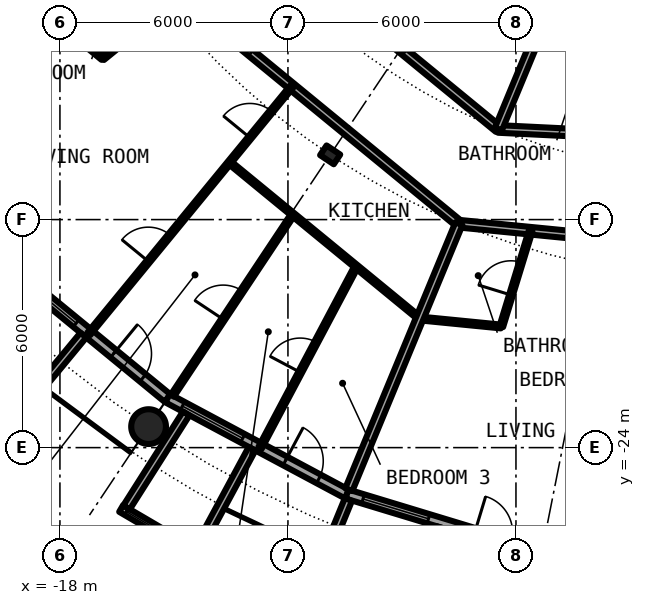
"""IFC4 building model, lengths in metres.
Left out: names, types, materials, properties, quantities, classifications, styles, units other than length and angle.
Written with IfcOpenShell. Run it as: python <this file> out.ifc"""

import sys

from ifc_helpers import new_model, si_unit, direction, frame, frame_2d, origin, origin_2d, place, context, subcontext, project, spatial, rectangle, circle, hollow_circle, i_section, extrude, element, fill, save


model = new_model("IFC4")
c1 = context("Model", 3, precision=1e-05, world=origin(), true_north=direction((0.0, 1.0)))
c2 = subcontext(c1, "Body", "Model", "MODEL_VIEW")
j1 = project(units=[si_unit("LENGTHUNIT", "METRE"), si_unit("PLANEANGLEUNIT", "RADIAN")], contexts=[c1])
p1 = place(None, origin())
s1 = spatial("IfcSite", under=j1, at=p1, CompositionType="ELEMENT")
p2 = place(p1, origin())
s2 = spatial("IfcBuilding", under=s1, at=p2, CompositionType="ELEMENT")
p3 = place(p2, frame((0.0, 0.0, 111.65)))
s3 = spatial("IfcBuildingStorey", under=s2, at=p3, CompositionType="ELEMENT", Elevation=111.65)
p4 = place(p3, frame((-15.667, -23.448, 0.0), z_axis=(0.0, 0.0, 1.0), x_axis=(1.0, 0.0, 0.0)))
e1 = element("IfcColumn", 1, at=p4, inside=s3, PredefinedType="COLUMN", context=c2, shape_type="SweptSolid", body=[
    extrude(hollow_circle(Radius=0.457, WallThickness=0.04, at=origin_2d()), origin(), (0.0, 0.0, 1.0), 3.05),
])
p5 = place(p3, frame((-10.889, -16.297, 0.0), z_axis=(0.0, 0.0, 1.0), x_axis=(-0.55557023302, -0.831469612303, 0.0)))
e2 = element("IfcColumn", 2, at=p5, inside=s3, PredefinedType="COLUMN", context=c2, shape_type="SweptSolid", body=[
    extrude(i_section(OverallWidth=0.307, OverallDepth=0.432, WebThickness=0.021, FlangeThickness=0.04, FilletRadius=0.027, at=origin_2d()), origin(), (0.0, 0.0, 1.0), 3.05),
])
p6 = place(p3, frame((-19.304, -19.304, 0.0), z_axis=(0.0, 0.0, 1.0), x_axis=(0.773019449054, -0.634382322723, 0.0)))
e3 = element("IfcWall", 3, at=p6, inside=s3, PredefinedType="SOLIDWALL", context=c2, shape_type="SweptSolid", body=[
    extrude(rectangle(XDim=5.352, YDim=0.25, at=frame_2d((2.676, 0.0))), origin(), (0.0, 0.0, 1.0), 2.7),
])
p7 = place(p6, frame((0.441, 0.0, 0.3)))
e4 = element("IfcOpeningElement", 4, at=p7, cuts=e3, PredefinedType="OPENING", context=c2, shape_type="SweptSolid", body=[
    extrude(rectangle(XDim=1.8, YDim=2.1, at=frame_2d((0.9, 1.05))), frame((0.0, 0.135, 0.0), z_axis=(0.0, -1.0, 0.0), x_axis=(1.0, 0.0, 0.0)), (0.0, 0.0, 1.0), 0.27),
])
p8 = place(p6, frame((3.51, 0.0, 0.0)))
e5 = element("IfcOpeningElement", 5, at=p8, cuts=e3, PredefinedType="OPENING", context=c2, shape_type="SweptSolid", body=[
    extrude(rectangle(XDim=1.0, YDim=2.2, at=frame_2d((0.5, 1.1))), frame((0.0, 0.135, 0.0), z_axis=(0.0, -1.0, 0.0), x_axis=(1.0, 0.0, 0.0)), (0.0, 0.0, 1.0), 0.27),
])
p9 = place(p3, frame((-17.384, -21.041, -0.03), z_axis=(0.0, 0.0, 1.0), x_axis=(-0.63709551667, -0.770784861449, 0.0)))
e6 = element("IfcWall", 6, at=p9, inside=s3, PredefinedType="SOLIDWALL", context=c2, shape_type="SweptSolid", body=[
    extrude(rectangle(XDim=3.006, YDim=0.2, at=frame_2d((1.503, 0.0))), origin(), (0.0, 0.0, 1.0), 2.73),
])
p10 = place(p3, frame((-15.167, -22.699, 0.0), z_axis=(0.0, 0.0, 1.0), x_axis=(0.881915646801, -0.471407246368, 0.0)))
e7 = element("IfcWall", 7, at=p10, inside=s3, PredefinedType="SOLIDWALL", context=c2, shape_type="SweptSolid", body=[
    extrude(rectangle(XDim=5.352, YDim=0.25, at=frame_2d((2.676, 0.0))), origin(), (0.0, 0.0, 1.0), 2.7),
])
p11 = place(p10, frame((0.441, 0.0, 0.3)))
e8 = element("IfcOpeningElement", 8, at=p11, cuts=e7, PredefinedType="OPENING", context=c2, shape_type="SweptSolid", body=[
    extrude(rectangle(XDim=1.8, YDim=2.1, at=frame_2d((0.9, 1.05))), frame((0.0, 0.135, 0.0), z_axis=(0.0, -1.0, 0.0), x_axis=(1.0, 0.0, 0.0)), (0.0, 0.0, 1.0), 0.27),
])
p12 = place(p10, frame((3.51, 0.0, 0.0)))
e9 = element("IfcOpeningElement", 9, at=p12, cuts=e7, PredefinedType="OPENING", context=c2, shape_type="SweptSolid", body=[
    extrude(rectangle(XDim=1.0, YDim=2.2, at=frame_2d((0.5, 1.1))), frame((0.0, 0.135, 0.0), z_axis=(0.0, -1.0, 0.0), x_axis=(1.0, 0.0, 0.0)), (0.0, 0.0, 1.0), 0.27),
])
p13 = place(p3, frame((-16.39, -25.603, -0.03), z_axis=(0.0, 0.0, 1.0), x_axis=(0.862762477128, -0.505609442218, 0.0)))
e10 = element("IfcWall", 10, at=p13, inside=s3, PredefinedType="SOLIDWALL", context=c2, shape_type="SweptSolid", body=[
    extrude(rectangle(XDim=2.391, YDim=0.2, at=frame_2d((1.196, 0.0))), origin(), (0.0, 0.0, 1.0), 2.73),
])
p14 = place(p13, frame((0.156, 0.0, 0.33)))
e11 = element("IfcOpeningElement", 11, at=p14, cuts=e10, PredefinedType="OPENING", context=c2, shape_type="SweptSolid", body=[
    extrude(circle(Radius=1.04, at=frame_2d((1.04, 1.04))), frame((0.0, 0.11, 0.0), z_axis=(0.0, -1.0, 0.0), x_axis=(1.0, 0.0, 0.0)), (0.0, 0.0, 1.0), 0.22),
])
p15 = place(p3, frame((-14.678, -23.102, -0.03), z_axis=(0.0, 0.0, 1.0), x_axis=(-0.536001536573, -0.844217005746, 0.0)))
e12 = element("IfcWall", 12, at=p15, inside=s3, PredefinedType="SOLIDWALL", context=c2, shape_type="SweptSolid", body=[
    extrude(rectangle(XDim=2.929, YDim=0.2, at=frame_2d((1.465, 0.0))), origin(), (0.0, 0.0, 1.0), 2.73),
])
p16 = place(p3, frame((-12.945, -24.029, -0.03), z_axis=(0.0, 0.0, 1.0), x_axis=(-0.474424310775, -0.88029629861, 0.0)))
e13 = element("IfcWall", 13, at=p16, inside=s3, PredefinedType="SOLIDWALL", context=c2, shape_type="SweptSolid", body=[
    extrude(rectangle(XDim=3.006, YDim=0.2, at=frame_2d((1.503, 0.0))), origin(), (0.0, 0.0, 1.0), 2.73),
])
p17 = place(p3, frame((-10.447, -25.222, 0.0), z_axis=(0.0, 0.0, 1.0), x_axis=(0.956965678721, -0.290201119486, 0.0)))
e14 = element("IfcWall", 14, at=p17, inside=s3, PredefinedType="SOLIDWALL", context=c2, shape_type="SweptSolid", body=[
    extrude(rectangle(XDim=5.351, YDim=0.25, at=frame_2d((2.676, 0.0))), origin(), (0.0, 0.0, 1.0), 2.7),
])
p18 = place(p17, frame((0.441, 0.0, 0.3)))
e15 = element("IfcOpeningElement", 15, at=p18, cuts=e14, PredefinedType="OPENING", context=c2, shape_type="SweptSolid", body=[
    extrude(rectangle(XDim=1.8, YDim=2.1, at=frame_2d((0.9, 1.05))), frame((0.0, 0.135, 0.0), z_axis=(0.0, -1.0, 0.0), x_axis=(1.0, 0.0, 0.0)), (0.0, 0.0, 1.0), 0.27),
])
p19 = place(p17, frame((3.51, 0.0, 0.0)))
e16 = element("IfcOpeningElement", 16, at=p19, cuts=e14, PredefinedType="OPENING", context=c2, shape_type="SweptSolid", body=[
    extrude(rectangle(XDim=1.0, YDim=2.2, at=frame_2d((0.5, 1.1))), frame((0.0, 0.135, 0.0), z_axis=(0.0, -1.0, 0.0), x_axis=(1.0, 0.0, 0.0)), (0.0, 0.0, 1.0), 0.27),
])
p20 = place(p3, frame((-10.409, -25.364, -0.03), z_axis=(0.0, 0.0, 1.0), x_axis=(-0.379509886562, -0.925187681501, 0.0)))
e17 = element("IfcWall", 17, at=p20, inside=s3, PredefinedType="SOLIDWALL", context=c2, shape_type="SweptSolid", body=[
    extrude(rectangle(XDim=2.883, YDim=0.2, at=frame_2d((1.441, 0.0))), origin(), (0.0, 0.0, 1.0), 2.73),
])
p21 = place(p3, frame((-8.009, -26.092, -0.03), z_axis=(0.0, 0.0, 1.0), x_axis=(-0.293406695073, -0.955987715029, 0.0)))
e18 = element("IfcWall", 18, at=p21, inside=s3, PredefinedType="SOLIDWALL", context=c2, shape_type="SweptSolid", body=[
    extrude(rectangle(XDim=3.006, YDim=0.2, at=frame_2d((1.503, 0.0))), origin(), (0.0, 0.0, 1.0), 2.73),
])
p22 = place(p3, frame((-18.542, -12.389, 0.0), z_axis=(0.0, 0.0, 1.0), x_axis=(0.772948171844, -0.634469166818, 0.0)))
e19 = element("IfcWall", 19, at=p22, inside=s3, PredefinedType="PARTITIONING", context=c2, shape_type="SweptSolid", body=[
    extrude(rectangle(XDim=2.158, YDim=0.1, at=frame_2d((1.079, 0.0))), origin(), (0.0, 0.0, 1.0), 2.7),
])
p23 = place(p3, frame((-13.538, -16.496, 0.0), z_axis=(0.0, 0.0, 1.0), x_axis=(0.773000340237, -0.634405606843, 0.0)))
e20 = element("IfcWall", 20, at=p23, inside=s3, PredefinedType="PARTITIONING", context=c2, shape_type="SweptSolid", body=[
    extrude(rectangle(XDim=6.474, YDim=0.1, at=frame_2d((3.237, 0.0))), origin(), (0.0, 0.0, 1.0), 2.7),
])
p24 = place(p3, frame((-8.541, -20.601, 0.0), z_axis=(0.0, 0.0, 1.0), x_axis=(0.995168464509, -0.098182112661, 0.0)))
e21 = element("IfcWall", 21, at=p24, inside=s3, PredefinedType="PARTITIONING", context=c2, shape_type="SweptSolid", body=[
    extrude(rectangle(XDim=2.158, YDim=0.1, at=frame_2d((1.079, 0.0))), origin(), (0.0, 0.0, 1.0), 2.7),
])
p25 = place(p3, frame((-16.173, -10.991, 0.0), z_axis=(0.0, 0.0, 1.0), x_axis=(0.773013989296, -0.634388975591, 0.0)))
e22 = element("IfcWall", 22, at=p25, inside=s3, PredefinedType="PARTITIONING", context=c2, shape_type="SweptSolid", body=[
    extrude(rectangle(XDim=11.219, YDim=0.2, at=frame_2d((5.609, 0.0))), origin(), (0.0, 0.0, 1.0), 2.39),
])
p26 = place(p25, frame((3.135, 0.0, 0.0)))
e23 = element("IfcOpeningElement", 23, at=p26, cuts=e22, PredefinedType="OPENING", context=c2, shape_type="SweptSolid", body=[
    extrude(rectangle(XDim=1.0, YDim=2.3, at=frame_2d((0.5, 1.15))), frame((0.0, 0.11, 0.0), z_axis=(0.0, -1.0, 0.0), x_axis=(1.0, 0.0, 0.0)), (0.0, 0.0, 1.0), 0.22),
])
p27 = place(p3, frame((-7.501, -18.108, 0.0), z_axis=(0.0, 0.0, 1.0), x_axis=(0.995189414306, -0.097969534313, 0.0)))
e24 = element("IfcWall", 24, at=p27, inside=s3, PredefinedType="PARTITIONING", context=c2, shape_type="SweptSolid", body=[
    extrude(rectangle(XDim=11.219, YDim=0.2, at=frame_2d((5.609, 0.0))), origin(), (0.0, 0.0, 1.0), 2.39),
])
p28 = place(p27, frame((3.847, 0.0, 0.0)))
e25 = element("IfcOpeningElement", 25, at=p28, cuts=e24, PredefinedType="OPENING", context=c2, shape_type="SweptSolid", body=[
    extrude(rectangle(XDim=1.0, YDim=2.3, at=frame_2d((0.5, 1.15))), frame((0.0, 0.11, 0.0), z_axis=(0.0, -1.0, 0.0), x_axis=(1.0, 0.0, 0.0)), (0.0, 0.0, 1.0), 0.22),
])
p29 = place(p3, frame((-14.05, -9.392, 0.0), z_axis=(0.0, 0.0, 1.0), x_axis=(0.773074935257, -0.634314704605, 0.0)))
e26 = element("IfcWall", 26, at=p29, inside=s3, PredefinedType="PARTITIONING", context=c2, shape_type="SweptSolid", body=[
    extrude(rectangle(XDim=9.809, YDim=0.2, at=frame_2d((4.904, 0.0))), origin(), (0.0, 0.0, 1.0), 2.7),
])
p30 = place(p29, frame((4.402, 0.0, 0.0)))
e27 = element("IfcOpeningElement", 27, at=p30, cuts=e26, PredefinedType="OPENING", context=c2, shape_type="SweptSolid", body=[
    extrude(rectangle(XDim=1.0, YDim=2.3, at=frame_2d((0.5, 1.15))), frame((0.0, 0.11, 0.0), z_axis=(0.0, -1.0, 0.0), x_axis=(1.0, 0.0, 0.0)), (0.0, 0.0, 1.0), 0.22),
])
p31 = place(p3, frame((-6.467, -15.615, 0.0), z_axis=(0.0, 0.0, 1.0), x_axis=(0.998803328932, -0.048907158111, 0.0)))
e28 = element("IfcWall", 28, at=p31, inside=s3, PredefinedType="PARTITIONING", context=c2, shape_type="SweptSolid", body=[
    extrude(rectangle(XDim=11.392, YDim=0.2, at=frame_2d((5.696, 0.0))), origin(), (0.0, 0.0, 1.0), 2.7),
])
p32 = place(p31, frame((4.381, 0.0, 0.0)))
e29 = element("IfcOpeningElement", 29, at=p32, cuts=e28, PredefinedType="OPENING", context=c2, shape_type="SweptSolid", body=[
    extrude(rectangle(XDim=1.0, YDim=2.3, at=frame_2d((0.5, 1.15))), frame((0.0, 0.11, 0.0), z_axis=(0.0, -1.0, 0.0), x_axis=(1.0, 0.0, 0.0)), (0.0, 0.0, 1.0), 0.22),
])
p33 = place(p3, frame((-22.595, -15.097, 0.0), z_axis=(0.0, 0.0, 1.0), x_axis=(0.831467903109, 0.555572791, 0.0)))
e30 = element("IfcWall", 30, at=p33, inside=s3, PredefinedType="PARTITIONING", context=c2, shape_type="SweptSolid", body=[
    extrude(rectangle(XDim=7.358, YDim=0.2, at=frame_2d((3.679, 0.0))), origin(), (0.0, 0.0, 1.0), 2.7),
])
p34 = place(p3, frame((-17.24, -21.007, 0.0), z_axis=(0.0, 0.0, 1.0), x_axis=(0.634396151441, 0.77300810024, 0.0)))
e31 = element("IfcWall", 31, at=p34, inside=s3, PredefinedType="PARTITIONING", context=c2, shape_type="SweptSolid", body=[
    extrude(rectangle(XDim=8.419, YDim=0.1, at=frame_2d((4.209, 0.0))), origin(), (0.0, 0.0, 1.0), 2.7),
])
p35 = place(p34, frame((6.679, 0.0, 0.0)))
e32 = element("IfcOpeningElement", 32, at=p35, cuts=e31, PredefinedType="OPENING", context=c2, shape_type="SweptSolid", body=[
    extrude(rectangle(XDim=0.9, YDim=2.3, at=frame_2d((0.45, 1.15))), frame((0.0, 0.06, 0.0), z_axis=(0.0, -1.0, 0.0), x_axis=(1.0, 0.0, 0.0)), (0.0, 0.0, 1.0), 0.12),
])
p36 = place(p34, frame((2.468, 0.0, 0.0)))
e33 = element("IfcOpeningElement", 33, at=p36, cuts=e31, PredefinedType="OPENING", context=c2, shape_type="SweptSolid", body=[
    extrude(rectangle(XDim=0.9, YDim=2.3, at=frame_2d((0.45, 1.15))), frame((0.0, 0.06, 0.0), z_axis=(0.0, -1.0, 0.0), x_axis=(1.0, 0.0, 0.0)), (0.0, 0.0, 1.0), 0.12),
])
p37 = place(p3, frame((-16.872, -13.761, 0.0), z_axis=(0.0, 0.0, 1.0), x_axis=(0.774979608522, 0.631986239072, 0.0)))
e34 = element("IfcWall", 34, at=p37, inside=s3, PredefinedType="PARTITIONING", context=c2, shape_type="SweptSolid", body=[
    extrude(rectangle(XDim=2.636, YDim=0.1, at=frame_2d((1.318, 0.0))), origin(), (0.0, 0.0, 1.0), 2.7),
])
p38 = place(p37, frame((0.868, 0.0, 0.0)))
e35 = element("IfcOpeningElement", 35, at=p38, cuts=e34, PredefinedType="OPENING", context=c2, shape_type="SweptSolid", body=[
    extrude(rectangle(XDim=0.9, YDim=2.3, at=frame_2d((0.45, 1.15))), frame((0.0, 0.06, 0.0), z_axis=(0.0, -1.0, 0.0), x_axis=(1.0, 0.0, 0.0)), (0.0, 0.0, 1.0), 0.12),
])
p39 = place(p3, frame((-15.041, -22.632, 0.0), z_axis=(0.0, 0.0, 1.0), x_axis=(0.553637025191, 0.83275809473, 0.0)))
e36 = element("IfcWall", 36, at=p39, inside=s3, PredefinedType="PARTITIONING", context=c2, shape_type="SweptSolid", body=[
    extrude(rectangle(XDim=5.726, YDim=0.1, at=frame_2d((2.863, 0.0))), origin(), (0.0, 0.0, 1.0), 2.7),
])
p40 = place(p39, frame((2.412, 0.0, 0.0)))
e37 = element("IfcOpeningElement", 37, at=p40, cuts=e36, PredefinedType="OPENING", context=c2, shape_type="SweptSolid", body=[
    extrude(rectangle(XDim=0.9, YDim=2.3, at=frame_2d((0.45, 1.15))), frame((0.0, 0.06, 0.0), z_axis=(0.0, -1.0, 0.0), x_axis=(1.0, 0.0, 0.0)), (0.0, 0.0, 1.0), 0.12),
])
p41 = place(p3, frame((-12.734, -24.007, 0.0), z_axis=(0.0, 0.0, 1.0), x_axis=(0.468610030042, 0.883405139075, 0.0)))
e38 = element("IfcWall", 38, at=p41, inside=s3, PredefinedType="PARTITIONING", context=c2, shape_type="SweptSolid", body=[
    extrude(rectangle(XDim=5.403, YDim=0.1, at=frame_2d((2.702, 0.0))), origin(), (0.0, 0.0, 1.0), 2.7),
])
p42 = place(p41, frame((2.252, 0.0, 0.0)))
e39 = element("IfcOpeningElement", 39, at=p42, cuts=e38, PredefinedType="OPENING", context=c2, shape_type="SweptSolid", body=[
    extrude(rectangle(XDim=0.9, YDim=2.3, at=frame_2d((0.45, 1.15))), frame((0.0, 0.06, 0.0), z_axis=(0.0, -1.0, 0.0), x_axis=(1.0, 0.0, 0.0)), (0.0, 0.0, 1.0), 0.12),
])
p43 = place(p3, frame((-10.399, -25.106, 0.0), z_axis=(0.0, 0.0, 1.0), x_axis=(0.382600411313, 0.923913916587, 0.0)))
e40 = element("IfcWall", 40, at=p43, inside=s3, PredefinedType="PARTITIONING", context=c2, shape_type="SweptSolid", body=[
    extrude(rectangle(XDim=7.574, YDim=0.2, at=frame_2d((3.787, 0.0))), origin(), (0.0, 0.0, 1.0), 2.7),
])
p44 = place(p3, frame((-6.462, -15.616, 0.0), z_axis=(0.0, 0.0, 1.0), x_axis=(0.382556139466, 0.923932248683, 0.0)))
e41 = element("IfcWall", 41, at=p44, inside=s3, PredefinedType="PARTITIONING", context=c2, shape_type="SweptSolid", body=[
    extrude(rectangle(XDim=9.18, YDim=0.2, at=frame_2d((4.59, 0.0))), origin(), (0.0, 0.0, 1.0), 2.7),
])
p45 = place(p3, frame((-6.386, -20.814, 0.0), z_axis=(0.0, 0.0, 1.0), x_axis=(0.293239623814, 0.956038975683, 0.0)))
e42 = element("IfcWall", 42, at=p45, inside=s3, PredefinedType="PARTITIONING", context=c2, shape_type="SweptSolid", body=[
    extrude(rectangle(XDim=2.636, YDim=0.1, at=frame_2d((1.318, 0.0))), origin(), (0.0, 0.0, 1.0), 2.7),
])
p46 = place(p45, frame((0.868, 0.0, 0.0)))
e43 = element("IfcOpeningElement", 43, at=p46, cuts=e42, PredefinedType="OPENING", context=c2, shape_type="SweptSolid", body=[
    extrude(rectangle(XDim=0.9, YDim=2.3, at=frame_2d((0.45, 1.15))), frame((0.0, 0.06, 0.0), z_axis=(0.0, -1.0, 0.0), x_axis=(1.0, 0.0, 0.0)), (0.0, 0.0, 1.0), 0.12),
])
p47 = place(p7, origin())
e44 = element("IfcWindow", 44, at=p47, inside=s3, PartitioningType="SINGLE_PANEL", PredefinedType="WINDOW", context=c2, shape_type="SweptSolid", body=[
    extrude(rectangle(XDim=1.8, YDim=2.1, at=frame_2d((0.9, 1.05))), frame((0.0, 0.03, 0.0), z_axis=(0.0, -1.0, 0.0), x_axis=(1.0, 0.0, 0.0)), (0.0, 0.0, 1.0), 0.06),
])
fill(e4, e44)
p48 = place(p8, origin())
e45 = element("IfcDoor", 45, at=p48, inside=s3, OperationType="SINGLE_SWING_LEFT", PredefinedType="DOOR", context=c2, shape_type="SweptSolid", body=[
    extrude(rectangle(XDim=1.0, YDim=2.2, at=frame_2d((0.5, 1.1))), frame((0.0, 0.025, 0.0), z_axis=(0.0, -1.0, 0.0), x_axis=(1.0, 0.0, 0.0)), (0.0, 0.0, 1.0), 0.05),
])
fill(e5, e45)
p49 = place(p11, origin())
e46 = element("IfcWindow", 46, at=p49, inside=s3, PartitioningType="SINGLE_PANEL", PredefinedType="WINDOW", context=c2, shape_type="SweptSolid", body=[
    extrude(rectangle(XDim=1.8, YDim=2.1, at=frame_2d((0.9, 1.05))), frame((0.0, 0.03, 0.0), z_axis=(0.0, -1.0, 0.0), x_axis=(1.0, 0.0, 0.0)), (0.0, 0.0, 1.0), 0.06),
])
fill(e8, e46)
p50 = place(p14, origin())
e47 = element("IfcWindow", 47, at=p50, inside=s3, PartitioningType="SINGLE_PANEL", PredefinedType="WINDOW", context=c2, shape_type="SweptSolid", body=[
    extrude(circle(Radius=1.04, at=frame_2d((1.04, 1.04))), frame((0.0, 0.03, 0.0), z_axis=(0.0, -1.0, 0.0), x_axis=(1.0, 0.0, 0.0)), (0.0, 0.0, 1.0), 0.06),
])
fill(e11, e47)
p51 = place(p12, origin())
e48 = element("IfcDoor", 48, at=p51, inside=s3, OperationType="SINGLE_SWING_LEFT", PredefinedType="DOOR", context=c2, shape_type="SweptSolid", body=[
    extrude(rectangle(XDim=1.0, YDim=2.2, at=frame_2d((0.5, 1.1))), frame((0.0, 0.025, 0.0), z_axis=(0.0, -1.0, 0.0), x_axis=(1.0, 0.0, 0.0)), (0.0, 0.0, 1.0), 0.05),
])
fill(e9, e48)
p52 = place(p18, origin())
e49 = element("IfcWindow", 49, at=p52, inside=s3, PartitioningType="SINGLE_PANEL", PredefinedType="WINDOW", context=c2, shape_type="SweptSolid", body=[
    extrude(rectangle(XDim=1.8, YDim=2.1, at=frame_2d((0.9, 1.05))), frame((0.0, 0.03, 0.0), z_axis=(0.0, -1.0, 0.0), x_axis=(1.0, 0.0, 0.0)), (0.0, 0.0, 1.0), 0.06),
])
fill(e15, e49)
p53 = place(p26, origin())
e50 = element("IfcDoor", 50, at=p53, inside=s3, OperationType="SINGLE_SWING_LEFT", PredefinedType="DOOR", context=c2, shape_type="SweptSolid", body=[
    extrude(rectangle(XDim=1.0, YDim=2.3, at=frame_2d((0.5, 1.15))), frame((0.0, 0.025, 0.0), z_axis=(0.0, -1.0, 0.0), x_axis=(1.0, 0.0, 0.0)), (0.0, 0.0, 1.0), 0.05),
])
fill(e23, e50)
p54 = place(p35, origin())
e51 = element("IfcDoor", 51, at=p54, inside=s3, OperationType="SINGLE_SWING_RIGHT", PredefinedType="DOOR", context=c2, shape_type="SweptSolid", body=[
    extrude(rectangle(XDim=0.9, YDim=2.3, at=frame_2d((0.45, 1.15))), frame((0.0, 0.025, 0.0), z_axis=(0.0, -1.0, 0.0), x_axis=(1.0, 0.0, 0.0)), (0.0, 0.0, 1.0), 0.05),
])
fill(e32, e51)
p55 = place(p36, origin())
e52 = element("IfcDoor", 52, at=p55, inside=s3, OperationType="SINGLE_SWING_LEFT", PredefinedType="DOOR", context=c2, shape_type="SweptSolid", body=[
    extrude(rectangle(XDim=0.9, YDim=2.3, at=frame_2d((0.45, 1.15))), frame((0.0, 0.025, 0.0), z_axis=(0.0, -1.0, 0.0), x_axis=(1.0, 0.0, 0.0)), (0.0, 0.0, 1.0), 0.05),
])
fill(e33, e52)
p56 = place(p40, origin())
e53 = element("IfcDoor", 53, at=p56, inside=s3, OperationType="SINGLE_SWING_LEFT", PredefinedType="DOOR", context=c2, shape_type="SweptSolid", body=[
    extrude(rectangle(XDim=0.9, YDim=2.3, at=frame_2d((0.45, 1.15))), frame((0.0, 0.025, 0.0), z_axis=(0.0, -1.0, 0.0), x_axis=(1.0, 0.0, 0.0)), (0.0, 0.0, 1.0), 0.05),
])
fill(e37, e53)
p57 = place(p42, origin())
e54 = element("IfcDoor", 54, at=p57, inside=s3, OperationType="SINGLE_SWING_LEFT", PredefinedType="DOOR", context=c2, shape_type="SweptSolid", body=[
    extrude(rectangle(XDim=0.9, YDim=2.3, at=frame_2d((0.45, 1.15))), frame((0.0, 0.025, 0.0), z_axis=(0.0, -1.0, 0.0), x_axis=(1.0, 0.0, 0.0)), (0.0, 0.0, 1.0), 0.05),
])
fill(e39, e54)
p58 = place(p46, origin())
e55 = element("IfcDoor", 55, at=p58, inside=s3, OperationType="SINGLE_SWING_LEFT", PredefinedType="DOOR", context=c2, shape_type="SweptSolid", body=[
    extrude(rectangle(XDim=0.9, YDim=2.3, at=frame_2d((0.45, 1.15))), frame((0.0, 0.025, 0.0), z_axis=(0.0, -1.0, 0.0), x_axis=(1.0, 0.0, 0.0)), (0.0, 0.0, 1.0), 0.05),
])
fill(e43, e55)
save(model, sys.argv[1])
